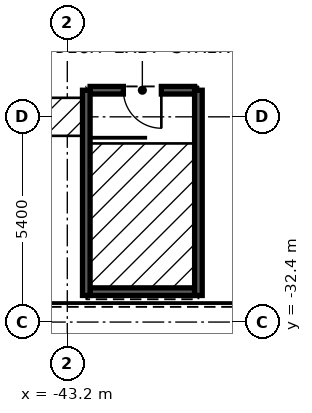
"""IFC4 building model, lengths in metres.
Left out: names, types, materials, properties, quantities, classifications, styles, units other than length and angle.
Written with IfcOpenShell. Run it as: python <this file> out.ifc"""

import sys

from ifc_helpers import new_model, si_unit, direction, frame, frame_2d, origin, place, context, subcontext, project, spatial, rectangle, extrude, element, fill, save


model = new_model("IFC4")
c1 = context("Model", 3, precision=1e-05, world=origin(), true_north=direction((0.0, 1.0)))
c2 = subcontext(c1, "Body", "Model", "MODEL_VIEW")
j1 = project(units=[si_unit("LENGTHUNIT", "METRE"), si_unit("PLANEANGLEUNIT", "RADIAN")], contexts=[c1])
p1 = place(None, origin())
s1 = spatial("IfcSite", under=j1, at=p1, CompositionType="ELEMENT")
p2 = place(p1, origin())
s2 = spatial("IfcBuilding", under=s1, at=p2, CompositionType="ELEMENT")
p3 = place(p2, frame((0.0, 0.0, 9.0)))
s3 = spatial("IfcBuildingStorey", under=s2, at=p3, CompositionType="ELEMENT", Elevation=9.0)
p4 = place(p3, frame((-42.6, -31.6, 0.0), z_axis=(0.0, 0.0, 1.0), x_axis=(1.0, 0.0, 0.0)))
e1 = element("IfcWall", 1, at=p4, inside=s3, PredefinedType="SOLIDWALL", context=c2, shape_type="SweptSolid", body=[
    extrude(rectangle(XDim=2.75, YDim=0.2, at=frame_2d((1.375, 0.0))), origin(), (0.0, 0.0, 1.0), 3.0),
])
p5 = place(p3, frame((-42.6, -26.3, 0.0), z_axis=(0.0, 0.0, 1.0), x_axis=(1.0, 0.0, 0.0)))
e2 = element("IfcWall", 2, at=p5, inside=s3, PredefinedType="SOLIDWALL", context=c2, shape_type="SweptSolid", body=[
    extrude(rectangle(XDim=2.75, YDim=0.2, at=frame_2d((1.375, 0.0))), origin(), (0.0, 0.0, 1.0), 3.0),
])
p6 = place(p5, frame((0.875, 0.0, 0.0)))
e3 = element("IfcOpeningElement", 3, at=p6, cuts=e2, PredefinedType="OPENING", context=c2, shape_type="SweptSolid", body=[
    extrude(rectangle(XDim=1.0, YDim=2.1, at=frame_2d((0.5, 1.05))), frame((0.0, 0.11, 0.0), z_axis=(0.0, -1.0, 0.0), x_axis=(1.0, 0.0, 0.0)), (0.0, 0.0, 1.0), 0.22),
])
for number, where, z_axis, x_axis in (
    (4, (-42.7, -31.7, 0.0), (0.0, 0.0, 1.0), (0.0, 1.0, 0.0)),
    (5, (-39.75, -31.7, 0.0), (0.0, 0.0, 1.0), (0.0, 1.0, 0.0)),
):
    element("IfcWall", number, at=place(p3, frame(where, z_axis=z_axis, x_axis=x_axis)), inside=s3, PredefinedType="SOLIDWALL", context=c2, shape_type="SweptSolid", body=[
        extrude(rectangle(XDim=5.4, YDim=0.2, at=frame_2d((2.7, 0.0))), origin(), (0.0, 0.0, 1.0), 3.0),
    ])
p7 = place(p6, origin())
e6 = element("IfcDoor", 6, at=p7, inside=s3, OperationType="SINGLE_SWING_RIGHT", PredefinedType="DOOR", context=c2, shape_type="SweptSolid", body=[
    extrude(rectangle(XDim=1.0, YDim=2.1, at=frame_2d((0.5, 1.05))), frame((0.0, 0.025, 0.0), z_axis=(0.0, -1.0, 0.0), x_axis=(1.0, 0.0, 0.0)), (0.0, 0.0, 1.0), 0.05),
])
fill(e3, e6)
save(model, sys.argv[1])
